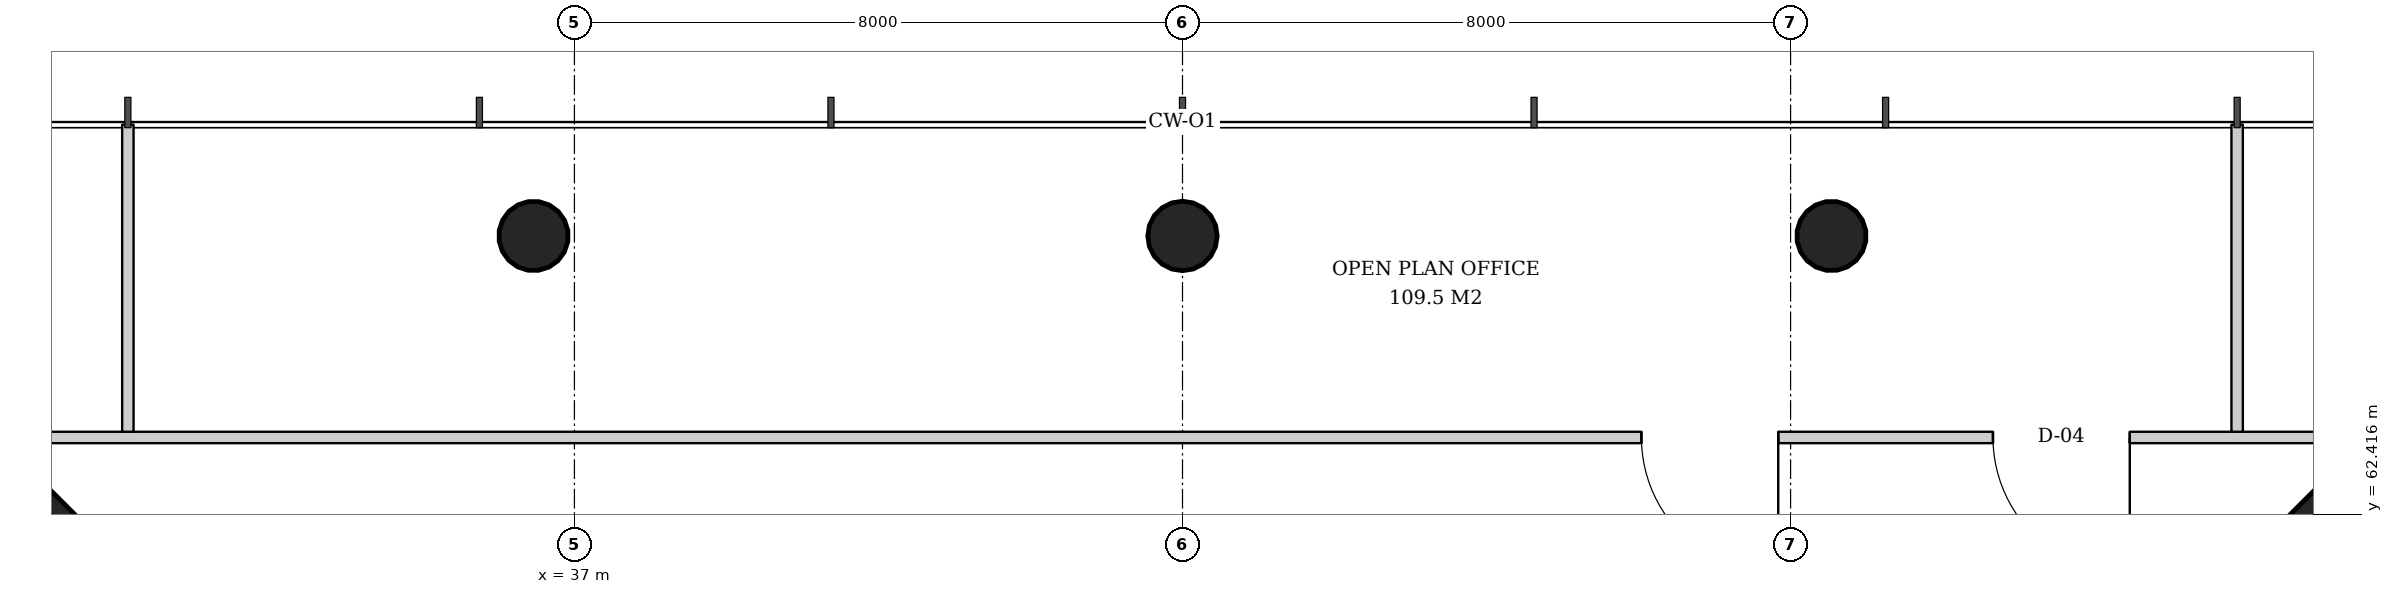
"""IFC4 building model, lengths in metres.
Left out: names, types, materials, properties, quantities, classifications, styles, units other than length and angle.
Written with IfcOpenShell. Run it as: python <this file> out.ifc"""

import sys

from ifc_helpers import new_model, si_unit, direction, frame, frame_2d, origin, origin_2d, place, context, subcontext, project, spatial, rectangle, hollow_circle, extrude, element, fill, save


model = new_model("IFC4")
c1 = context("Model", 3, precision=1e-05, world=origin(), true_north=direction((0.0, 1.0)))
c2 = subcontext(c1, "Body", "Model", "MODEL_VIEW")
j1 = project(units=[si_unit("LENGTHUNIT", "METRE"), si_unit("PLANEANGLEUNIT", "RADIAN")], contexts=[c1])
p1 = place(None, origin())
s1 = spatial("IfcSite", under=j1, at=p1, CompositionType="ELEMENT")
p2 = place(p1, origin())
s2 = spatial("IfcBuilding", under=s1, at=p2, CompositionType="ELEMENT")
p3 = place(p2, frame((0.0, 0.0, 142.6)))
s3 = spatial("IfcBuildingStorey", under=s2, at=p3, CompositionType="ELEMENT", Elevation=142.6)
for number, where, z_axis, x_axis in (
    (1, (61.014, 62.014, 0.0), (-0.032, -0.032, 0.999), (0.707, -0.707, 0.0)),
    (2, (28.986, 62.014, 0.0), (0.032, -0.032, 0.999), (0.707, 0.707, 0.0)),
):
    element("IfcColumn", number, at=place(p3, frame(where, z_axis=z_axis, x_axis=x_axis)), inside=s3, PredefinedType="COLUMN", context=c2, shape_type="SweptSolid", body=[
        extrude(rectangle(XDim=2.6, YDim=2.6, at=origin_2d()), origin(), (0.0, 0.0, 1.0), 3.804),
    ])
p4 = place(p3, frame((53.557, 66.114, 0.0), z_axis=(-0.01598826355, -0.031912317206, 0.999362786699), x_axis=(0.894067115991, -0.447933021895, 0.0)))
e3 = element("IfcColumn", 3, at=p4, inside=s3, PredefinedType="COLUMN", context=c2, shape_type="SweptSolid", body=[
    extrude(hollow_circle(Radius=0.457, WallThickness=0.03, at=origin_2d()), origin(), (0.0, 0.0, 1.0), 3.802),
])
p5 = place(p3, frame((45.0, 66.114, 0.0), z_axis=(0.0, -0.031916396774, 0.999490542035), x_axis=(1.0, 0.0, 0.0)))
e4 = element("IfcColumn", 4, at=p5, inside=s3, PredefinedType="COLUMN", context=c2, shape_type="SweptSolid", body=[
    extrude(hollow_circle(Radius=0.457, WallThickness=0.03, at=origin_2d()), origin(), (0.0, 0.0, 1.0), 3.802),
])
p6 = place(p3, frame((36.443, 66.114, 0.0), z_axis=(0.01598826355, -0.031912317206, 0.999362786699), x_axis=(0.894067115991, 0.447933021895, 0.0)))
e5 = element("IfcColumn", 5, at=p6, inside=s3, PredefinedType="COLUMN", context=c2, shape_type="SweptSolid", body=[
    extrude(hollow_circle(Radius=0.457, WallThickness=0.03, at=origin_2d()), origin(), (0.0, 0.0, 1.0), 3.802),
])
p7 = place(p3, frame((60.511, 63.425, 0.0), z_axis=(0.0, 0.0, 1.0), x_axis=(-1.0, 0.0, 0.0)))
e6 = element("IfcWall", 6, at=p7, inside=s3, PredefinedType="PARTITIONING", context=c2, shape_type="SweptSolid", body=[
    extrude(rectangle(XDim=31.023, YDim=0.15, at=frame_2d((15.511, 0.0))), origin(), (0.0, 0.0, 1.0), 2.72),
])
p8 = place(p7, frame((3.049, 0.0, 0.0)))
e7 = element("IfcOpeningElement", 7, at=p8, cuts=e6, PredefinedType="OPENING", context=c2, shape_type="SweptSolid", body=[
    extrude(rectangle(XDim=1.8, YDim=2.4, at=frame_2d((0.9, 1.2))), frame((0.0, 0.085, 0.0), z_axis=(0.0, -1.0, 0.0), x_axis=(1.0, 0.0, 0.0)), (0.0, 0.0, 1.0), 0.17),
])
p9 = place(p7, frame((7.674, 0.0, 0.0)))
e8 = element("IfcOpeningElement", 8, at=p9, cuts=e6, PredefinedType="OPENING", context=c2, shape_type="SweptSolid", body=[
    extrude(rectangle(XDim=1.8, YDim=2.4, at=frame_2d((0.9, 1.2))), frame((0.0, 0.085, 0.0), z_axis=(0.0, -1.0, 0.0), x_axis=(1.0, 0.0, 0.0)), (0.0, 0.0, 1.0), 0.17),
])
for number, where, z_axis, x_axis in (
    (9, (58.875, 63.5, 0.0), (0.0, 0.0, 1.0), (0.0, 1.0, 0.0)),
    (10, (31.125, 63.5, 0.0), (0.0, 0.0, 1.0), (0.0, 1.0, 0.0)),
):
    element("IfcWall", number, at=place(p3, frame(where, z_axis=z_axis, x_axis=x_axis)), inside=s3, PredefinedType="PARTITIONING", context=c2, shape_type="SweptSolid", body=[
        extrude(rectangle(XDim=4.04, YDim=0.15, at=frame_2d((2.02, 0.0))), origin(), (0.0, 0.0, 1.0), 2.82),
    ])
p10 = place(p8, origin())
e11 = element("IfcDoor", 11, at=p10, inside=s3, OperationType="DOUBLE_DOOR_SINGLE_SWING", PredefinedType="DOOR", context=c2, shape_type="SweptSolid", body=[
    extrude(rectangle(XDim=1.8, YDim=2.4, at=frame_2d((0.9, 1.2))), frame((0.0, 0.025, 0.0), z_axis=(0.0, -1.0, 0.0), x_axis=(1.0, 0.0, 0.0)), (0.0, 0.0, 1.0), 0.05),
])
fill(e7, e11)
p11 = place(p9, origin())
e12 = element("IfcDoor", 12, at=p11, inside=s3, OperationType="DOUBLE_DOOR_SINGLE_SWING", PredefinedType="DOOR", context=c2, shape_type="SweptSolid", body=[
    extrude(rectangle(XDim=1.8, YDim=2.4, at=frame_2d((0.9, 1.2))), frame((0.0, 0.025, 0.0), z_axis=(0.0, -1.0, 0.0), x_axis=(1.0, 0.0, 0.0)), (0.0, 0.0, 1.0), 0.05),
])
fill(e8, e12)
save(model, sys.argv[1])
